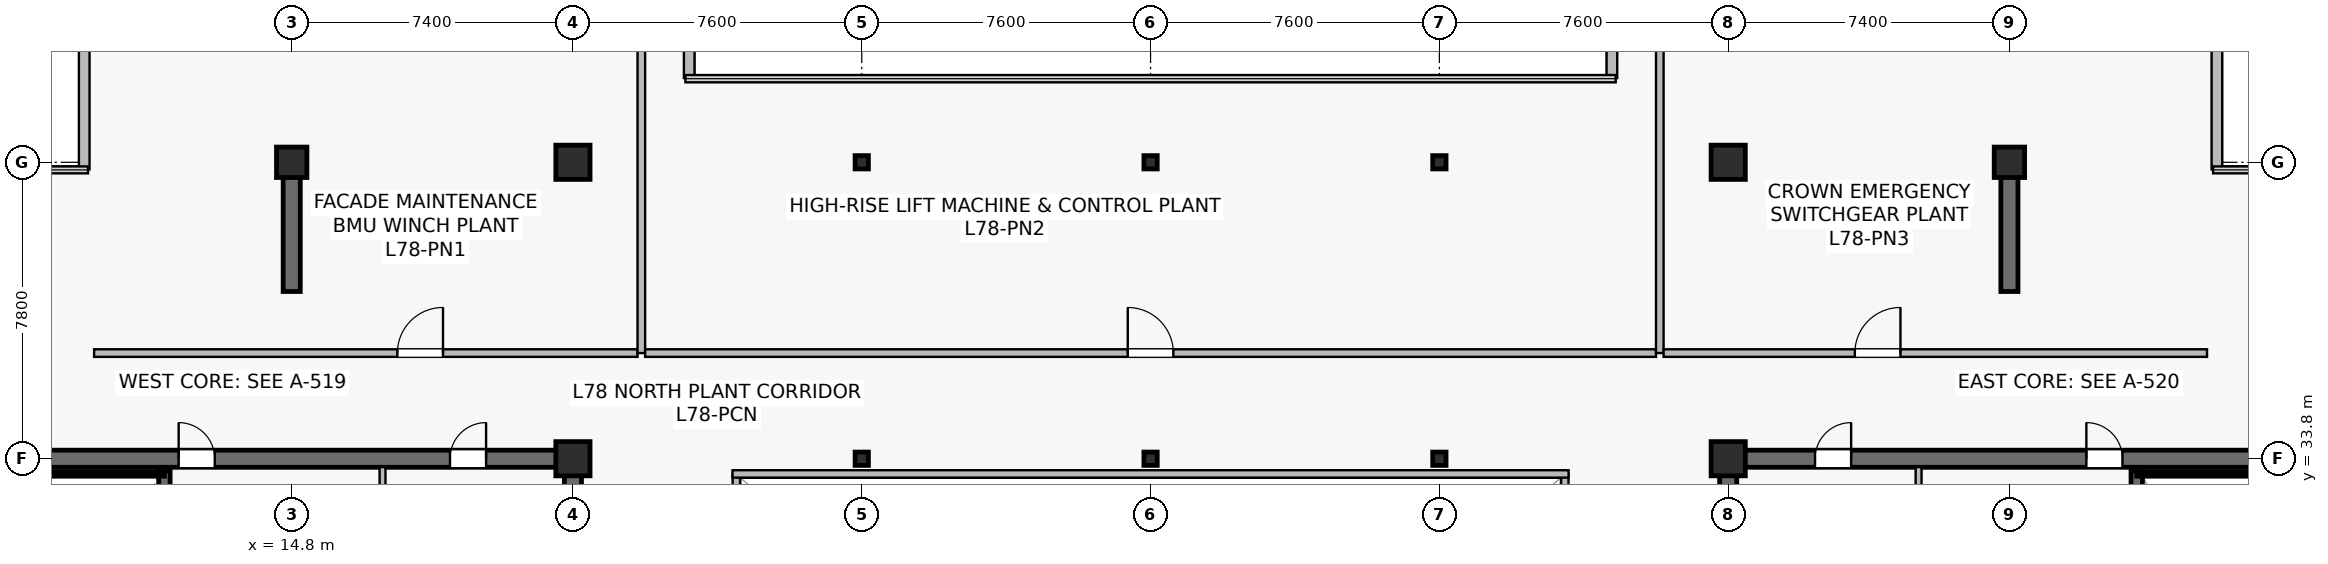
"""IFC4 building model, lengths in metres.
Left out: names, types, materials, properties, quantities, classifications, styles, units other than length and angle.
Written with IfcOpenShell. Run it as: python <this file> out.ifc"""

import sys

from ifc_helpers import new_model, si_unit, direction, frame, frame_2d, origin, origin_2d, place, context, subcontext, project, spatial, rectangle, i_section, extrude, source, transform, mapped, element, fill, save


model = new_model("IFC4")
c1 = context("Model", 3, precision=1e-05, world=origin(), true_north=direction((0.0, 1.0)))
c2 = subcontext(c1, "Body", "Model", "MODEL_VIEW")
j1 = project(units=[si_unit("LENGTHUNIT", "METRE"), si_unit("PLANEANGLEUNIT", "RADIAN")], contexts=[c1])
p1 = place(None, origin())
s1 = spatial("IfcSite", under=j1, at=p1, CompositionType="ELEMENT")
p2 = place(p1, origin())
s2 = spatial("IfcBuilding", under=s1, at=p2, CompositionType="ELEMENT")
p3 = place(p2, frame((0.0, 0.0, 327.0)))
s3 = spatial("IfcBuildingStorey", under=s2, at=p3, CompositionType="ELEMENT", Elevation=327.0)
p4 = place(p3, frame((7.175, 33.8, 0.0), z_axis=(0.0, 0.0, 1.0), x_axis=(1.0, 0.0, 0.0)))
e1 = element("IfcWall", 1, at=p4, inside=s3, PredefinedType="SHEAR", context=c2, shape_type="SweptSolid", body=[
    extrude(rectangle(XDim=15.25, YDim=0.45, at=frame_2d((7.625, 0.0))), origin(), (0.0, 0.0, 1.0), 5.12),
])
p5 = place(p4, frame((4.65, 0.0, 0.0)))
e2 = element("IfcOpeningElement", 2, at=p5, cuts=e1, PredefinedType="OPENING", context=c2, shape_type="SweptSolid", body=[
    extrude(rectangle(XDim=0.95, YDim=2.15, at=frame_2d((0.475, 1.075))), frame((0.0, 0.235, 0.0), z_axis=(0.0, -1.0, 0.0), x_axis=(1.0, 0.0, 0.0)), (0.0, 0.0, 1.0), 0.47),
])
p6 = place(p4, frame((11.79, 0.0, 0.0)))
e3 = element("IfcOpeningElement", 3, at=p6, cuts=e1, PredefinedType="OPENING", context=c2, shape_type="SweptSolid", body=[
    extrude(rectangle(XDim=0.95, YDim=2.15, at=frame_2d((0.475, 1.075))), frame((0.0, 0.235, 0.0), z_axis=(0.0, -1.0, 0.0), x_axis=(1.0, 0.0, 0.0)), (0.0, 0.0, 1.0), 0.47),
])
p7 = place(p3, frame((22.2, 15.025, 0.0), z_axis=(0.0, 0.0, 1.0), x_axis=(0.0, 1.0, 0.0)))
e4 = element("IfcWall", 4, at=p7, inside=s3, PredefinedType="SHEAR", context=c2, shape_type="SweptSolid", body=[
    extrude(rectangle(XDim=18.55, YDim=0.45, at=frame_2d((9.275, 0.0))), origin(), (0.0, 0.0, 1.0), 5.12),
])
p8 = place(p7, frame((3.525, 0.0, 0.0)))
e5 = element("IfcOpeningElement", 5, at=p8, cuts=e4, PredefinedType="OPENING", context=c2, shape_type="SweptSolid", body=[
    extrude(rectangle(XDim=1.42, YDim=2.2, at=frame_2d((0.71, 1.1))), frame((0.0, 0.235, 0.0), z_axis=(0.0, -1.0, 0.0), x_axis=(1.0, 0.0, 0.0)), (0.0, 0.0, 1.0), 0.47),
])
p9 = place(p3, frame((11.45, 24.85, 0.0), z_axis=(0.0, 0.0, 1.0), x_axis=(0.0, 1.0, 0.0)))
e6 = element("IfcWall", 6, at=p9, inside=s3, PredefinedType="SHEAR", context=c2, shape_type="SweptSolid", body=[
    extrude(rectangle(XDim=8.63, YDim=0.3, at=frame_2d((4.315, 0.0))), origin(), (0.0, 0.0, 1.0), 5.12),
])
p10 = place(p9, frame((0.42, 0.0, 0.0)))
e7 = element("IfcOpeningElement", 7, at=p10, cuts=e6, PredefinedType="OPENING", context=c2, shape_type="SweptSolid", body=[
    extrude(rectangle(XDim=1.1, YDim=2.15, at=frame_2d((0.55, 1.075))), frame((0.0, 0.16, 0.0), z_axis=(0.0, -1.0, 0.0), x_axis=(1.0, 0.0, 0.0)), (0.0, 0.0, 1.0), 0.32),
])
p11 = place(p3, frame((7.73, 33.4, 0.0), z_axis=(0.0, 0.0, 1.0), x_axis=(1.0, 0.0, 0.0)))
e8 = element("IfcWall", 8, at=p11, inside=s3, PredefinedType="SOLIDWALL", context=c2, shape_type="SweptSolid", body=[
    extrude(rectangle(XDim=3.72, YDim=0.12, at=frame_2d((1.86, 0.0))), origin(), (0.0, 0.0, 1.0), 5.12),
])
p12 = place(p3, frame((52.375, 33.8, 0.0), z_axis=(0.0, 0.0, 1.0), x_axis=(1.0, 0.0, 0.0)))
e9 = element("IfcWall", 9, at=p12, inside=s3, PredefinedType="SHEAR", context=c2, shape_type="SweptSolid", body=[
    extrude(rectangle(XDim=15.25, YDim=0.45, at=frame_2d((7.625, 0.0))), origin(), (0.0, 0.0, 1.0), 5.12),
])
p13 = place(p12, frame((9.65, 0.0, 0.0)))
e10 = element("IfcOpeningElement", 10, at=p13, cuts=e9, PredefinedType="OPENING", context=c2, shape_type="SweptSolid", body=[
    extrude(rectangle(XDim=0.95, YDim=2.15, at=frame_2d((0.475, 1.075))), frame((0.0, 0.235, 0.0), z_axis=(0.0, -1.0, 0.0), x_axis=(1.0, 0.0, 0.0)), (0.0, 0.0, 1.0), 0.47),
])
p14 = place(p12, frame((2.51, 0.0, 0.0)))
e11 = element("IfcOpeningElement", 11, at=p14, cuts=e9, PredefinedType="OPENING", context=c2, shape_type="SweptSolid", body=[
    extrude(rectangle(XDim=0.95, YDim=2.15, at=frame_2d((0.475, 1.075))), frame((0.0, 0.235, 0.0), z_axis=(0.0, -1.0, 0.0), x_axis=(1.0, 0.0, 0.0)), (0.0, 0.0, 1.0), 0.47),
])
p15 = place(p3, frame((52.6, 15.025, 0.0), z_axis=(0.0, 0.0, 1.0), x_axis=(0.0, 1.0, 0.0)))
e12 = element("IfcWall", 12, at=p15, inside=s3, PredefinedType="SHEAR", context=c2, shape_type="SweptSolid", body=[
    extrude(rectangle(XDim=18.55, YDim=0.45, at=frame_2d((9.275, 0.0))), origin(), (0.0, 0.0, 1.0), 5.12),
])
p16 = place(p15, frame((3.525, 0.0, 0.0)))
e13 = element("IfcOpeningElement", 13, at=p16, cuts=e12, PredefinedType="OPENING", context=c2, shape_type="SweptSolid", body=[
    extrude(rectangle(XDim=1.42, YDim=2.2, at=frame_2d((0.71, 1.1))), frame((0.0, 0.235, 0.0), z_axis=(0.0, -1.0, 0.0), x_axis=(1.0, 0.0, 0.0)), (0.0, 0.0, 1.0), 0.47),
])
p17 = place(p3, frame((63.35, 24.85, 0.0), z_axis=(0.0, 0.0, 1.0), x_axis=(0.0, 1.0, 0.0)))
e14 = element("IfcWall", 14, at=p17, inside=s3, PredefinedType="SHEAR", context=c2, shape_type="SweptSolid", body=[
    extrude(rectangle(XDim=8.63, YDim=0.3, at=frame_2d((4.315, 0.0))), origin(), (0.0, 0.0, 1.0), 5.12),
])
p18 = place(p17, frame((0.42, 0.0, 0.0)))
e15 = element("IfcOpeningElement", 15, at=p18, cuts=e14, PredefinedType="OPENING", context=c2, shape_type="SweptSolid", body=[
    extrude(rectangle(XDim=1.1, YDim=2.15, at=frame_2d((0.55, 1.075))), frame((0.0, 0.16, 0.0), z_axis=(0.0, -1.0, 0.0), x_axis=(1.0, 0.0, 0.0)), (0.0, 0.0, 1.0), 0.32),
])
p19 = place(p3, frame((63.35, 33.4, 0.0), z_axis=(0.0, 0.0, 1.0), x_axis=(1.0, 0.0, 0.0)))
e16 = element("IfcWall", 16, at=p19, inside=s3, PredefinedType="SOLIDWALL", context=c2, shape_type="SweptSolid", body=[
    extrude(rectangle(XDim=3.72, YDim=0.12, at=frame_2d((1.86, 0.0))), origin(), (0.0, 0.0, 1.0), 5.12),
])
for number, where, z_axis, x_axis in (
    (17, (14.8, 38.2, 0.0), (0.0, 0.0, 1.0), (0.0, 1.0, 0.0)),
    (18, (60.0, 38.2, 0.0), (0.0, 0.0, 1.0), (0.0, 1.0, 0.0)),
):
    element("IfcWall", number, at=place(p3, frame(where, z_axis=z_axis, x_axis=x_axis)), inside=s3, PredefinedType="SHEAR", context=c2, shape_type="SweptSolid", body=[
        extrude(rectangle(XDim=3.1, YDim=0.45, at=frame_2d((1.55, 0.0))), origin(), (0.0, 0.0, 1.0), 5.12),
    ])
m1 = source(origin(), c2, "Body", "SweptSolid", [
    extrude(rectangle(XDim=0.9, YDim=0.9, at=origin_2d()), origin(), (0.0, 0.0, 1.0), 5.4),
])
p20 = place(p3, frame((22.2, 33.8, 0.0), z_axis=(0.0, 0.0, 1.0), x_axis=(1.0, 0.0, 0.0)))
e19 = element("IfcColumn", 19, at=p20, inside=s3, PredefinedType="COLUMN", context=c2, shape_type="MappedRepresentation", body=[
    mapped(m1, transform((0.0, 0.0, 0.0), scale=1.0)),
])
m2 = source(origin(), c2, "Body", "SweptSolid", [
    extrude(rectangle(XDim=0.8, YDim=0.8, at=origin_2d()), origin(), (0.0, 0.0, 1.0), 5.4),
])
p21 = place(p3, frame((14.8, 41.6, 0.0), z_axis=(0.0, 0.0, 1.0), x_axis=(1.0, 0.0, 0.0)))
e20 = element("IfcColumn", 20, at=p21, inside=s3, PredefinedType="COLUMN", context=c2, shape_type="MappedRepresentation", body=[
    mapped(m2, transform((0.0, 0.0, 0.0), scale=1.0)),
])
for number, where, z_axis, x_axis in (
    (21, (22.2, 41.6, 0.0), (0.0, 0.0, 1.0), (1.0, 0.0, 0.0)),
    (22, (52.6, 33.8, 0.0), (0.0, 0.0, 1.0), (1.0, 0.0, 0.0)),
    (23, (52.6, 41.6, 0.0), (0.0, 0.0, 1.0), (1.0, 0.0, 0.0)),
):
    element("IfcColumn", number, at=place(p3, frame(where, z_axis=z_axis, x_axis=x_axis)), inside=s3, PredefinedType="COLUMN", context=c2, shape_type="MappedRepresentation", body=[
        mapped(m1, transform((0.0, 0.0, 0.0), scale=1.0)),
    ])
p22 = place(p3, frame((60.0, 41.6, 0.0), z_axis=(0.0, 0.0, 1.0), x_axis=(1.0, 0.0, 0.0)))
e24 = element("IfcColumn", 24, at=p22, inside=s3, PredefinedType="COLUMN", context=c2, shape_type="MappedRepresentation", body=[
    mapped(m2, transform((0.0, 0.0, 0.0), scale=1.0)),
])
m3 = source(origin(), c2, "Body", "SweptSolid", [
    extrude(i_section(OverallWidth=0.35, OverallDepth=0.35, WebThickness=0.012, FlangeThickness=0.019, at=origin_2d()), origin(), (0.0, 0.0, 1.0), 5.4),
])
for number, where, z_axis, x_axis in (
    (25, (29.8, 33.8, 0.0), (0.0, 0.0, 1.0), (1.0, 0.0, 0.0)),
    (26, (29.8, 41.6, 0.0), (0.0, 0.0, 1.0), (1.0, 0.0, 0.0)),
    (27, (37.4, 33.8, 0.0), (0.0, 0.0, 1.0), (1.0, 0.0, 0.0)),
    (28, (37.4, 41.6, 0.0), (0.0, 0.0, 1.0), (1.0, 0.0, 0.0)),
    (29, (45.0, 33.8, 0.0), (0.0, 0.0, 1.0), (1.0, 0.0, 0.0)),
    (30, (45.0, 41.6, 0.0), (0.0, 0.0, 1.0), (1.0, 0.0, 0.0)),
):
    element("IfcColumn", number, at=place(p3, frame(where, z_axis=z_axis, x_axis=x_axis)), inside=s3, PredefinedType="COLUMN", context=c2, shape_type="MappedRepresentation", body=[
        mapped(m3, transform((0.0, 0.0, 0.0), scale=1.0)),
    ])
p23 = place(p3, frame((65.46, 41.412, 0.0), z_axis=(0.0, 0.0, 1.0), x_axis=(0.0, 1.0, 0.0)))
e31 = element("IfcWall", 31, at=p23, inside=s3, PredefinedType="STANDARD", context=c2, shape_type="SweptSolid", body=[
    extrude(rectangle(XDim=3.488, YDim=0.28, at=frame_2d((1.744, 0.0))), origin(), (0.0, 0.0, 1.0), 5.12),
])
for number, where, z_axis, x_axis in (
    (32, (49.54, 44.9, 0.0), (0.0, 0.0, 1.0), (0.0, -1.0, 0.0)),
    (33, (25.26, 43.817, 0.0), (0.0, 0.0, 1.0), (0.0, 1.0, 0.0)),
):
    element("IfcWall", number, at=place(p3, frame(where, z_axis=z_axis, x_axis=x_axis)), inside=s3, PredefinedType="STANDARD", context=c2, shape_type="SweptSolid", body=[
        extrude(rectangle(XDim=1.083, YDim=0.28, at=frame_2d((0.542, 0.0))), origin(), (0.0, 0.0, 1.0), 5.12),
    ])
p24 = place(p3, frame((9.34, 44.9, 0.0), z_axis=(0.0, 0.0, 1.0), x_axis=(0.0, -1.0, 0.0)))
e34 = element("IfcWall", 34, at=p24, inside=s3, PredefinedType="STANDARD", context=c2, shape_type="SweptSolid", body=[
    extrude(rectangle(XDim=3.488, YDim=0.28, at=frame_2d((1.744, 0.0))), origin(), (0.0, 0.0, 1.0), 5.12),
])
for number, where, z_axis, x_axis in (
    (35, (17.19, 29.65, 0.0), (0.0, 0.0, 1.0), (0.0, 1.0, 0.0)),
    (36, (57.61, 29.65, 0.0), (0.0, 0.0, 1.0), (0.0, 1.0, 0.0)),
):
    element("IfcWall", number, at=place(p3, frame(where, z_axis=z_axis, x_axis=x_axis)), inside=s3, PredefinedType="PLUMBINGWALL", context=c2, shape_type="SweptSolid", body=[
        extrude(rectangle(XDim=3.93, YDim=0.155, at=frame_2d((1.965, 0.0))), origin(), (0.0, 0.0, 1.0), 5.12),
    ])
p25 = place(p3, frame((26.5, 15.2, 0.0), z_axis=(0.0, 0.0, 1.0), x_axis=(0.0, 1.0, 0.0)))
e37 = element("IfcWall", 37, at=p25, inside=s3, PredefinedType="SOLIDWALL", context=c2, shape_type="SweptSolid", body=[
    extrude(rectangle(XDim=18.2, YDim=0.195, at=frame_2d((9.1, 0.0))), origin(), (0.0, 0.0, 1.0), 5.12),
])
p26 = place(p25, frame((1.8, 0.0, 0.9)))
e38 = element("IfcOpeningElement", 38, at=p26, cuts=e37, PredefinedType="OPENING", context=c2, shape_type="SweptSolid", body=[
    extrude(rectangle(XDim=1.5, YDim=1.4, at=frame_2d((0.75, 0.7))), frame((0.0, 0.107, 0.0), z_axis=(0.0, -1.0, 0.0), x_axis=(1.0, 0.0, 0.0)), (0.0, 0.0, 1.0), 0.215),
])
p27 = place(p25, frame((13.2, 0.0, 0.9)))
e39 = element("IfcOpeningElement", 39, at=p27, cuts=e37, PredefinedType="OPENING", context=c2, shape_type="SweptSolid", body=[
    extrude(rectangle(XDim=1.5, YDim=1.4, at=frame_2d((0.75, 0.7))), frame((0.0, 0.107, 0.0), z_axis=(0.0, -1.0, 0.0), x_axis=(1.0, 0.0, 0.0)), (0.0, 0.0, 1.0), 0.215),
])
p28 = place(p3, frame((48.3, 15.2, 0.0), z_axis=(0.0, 0.0, 1.0), x_axis=(0.0, 1.0, 0.0)))
e40 = element("IfcWall", 40, at=p28, inside=s3, PredefinedType="SOLIDWALL", context=c2, shape_type="SweptSolid", body=[
    extrude(rectangle(XDim=18.2, YDim=0.195, at=frame_2d((9.1, 0.0))), origin(), (0.0, 0.0, 1.0), 5.12),
])
p29 = place(p28, frame((1.8, 0.0, 0.9)))
e41 = element("IfcOpeningElement", 41, at=p29, cuts=e40, PredefinedType="OPENING", context=c2, shape_type="SweptSolid", body=[
    extrude(rectangle(XDim=1.5, YDim=1.4, at=frame_2d((0.75, 0.7))), frame((0.0, 0.107, 0.0), z_axis=(0.0, -1.0, 0.0), x_axis=(1.0, 0.0, 0.0)), (0.0, 0.0, 1.0), 0.215),
])
p30 = place(p28, frame((13.2, 0.0, 0.9)))
e42 = element("IfcOpeningElement", 42, at=p30, cuts=e40, PredefinedType="OPENING", context=c2, shape_type="SweptSolid", body=[
    extrude(rectangle(XDim=1.5, YDim=1.4, at=frame_2d((0.75, 0.7))), frame((0.0, 0.107, 0.0), z_axis=(0.0, -1.0, 0.0), x_axis=(1.0, 0.0, 0.0)), (0.0, 0.0, 1.0), 0.215),
])
p31 = place(p3, frame((26.4, 33.4, 0.0), z_axis=(0.0, 0.0, 1.0), x_axis=(1.0, 0.0, 0.0)))
e43 = element("IfcWall", 43, at=p31, inside=s3, PredefinedType="SOLIDWALL", context=c2, shape_type="SweptSolid", body=[
    extrude(rectangle(XDim=22.0, YDim=0.195, at=frame_2d((11.0, 0.0))), origin(), (0.0, 0.0, 1.0), 5.12),
])
p32 = place(p3, frame((9.6, 36.58, 0.0), z_axis=(0.0, 0.0, 1.0), x_axis=(1.0, 0.0, 0.0)))
e44 = element("IfcWall", 44, at=p32, inside=s3, PredefinedType="SOLIDWALL", context=c2, shape_type="SweptSolid", body=[
    extrude(rectangle(XDim=14.3, YDim=0.2, at=frame_2d((7.15, 0.0))), origin(), (0.0, 0.0, 1.0), 4.517),
])
p33 = place(p32, frame((7.981, 0.0, 0.0)))
e45 = element("IfcOpeningElement", 45, at=p33, cuts=e44, PredefinedType="OPENING", context=c2, shape_type="SweptSolid", body=[
    extrude(rectangle(XDim=1.2, YDim=2.16, at=frame_2d((0.6, 1.08))), frame((0.0, 0.11, 0.0), z_axis=(0.0, -1.0, 0.0), x_axis=(1.0, 0.0, 0.0)), (0.0, 0.0, 1.0), 0.22),
])
p34 = place(p3, frame((24.0, 36.58, 0.0), z_axis=(0.0, 0.0, 1.0), x_axis=(0.0, 1.0, 0.0)))
e46 = element("IfcWall", 46, at=p34, inside=s3, PredefinedType="SOLIDWALL", context=c2, shape_type="SweptSolid", body=[
    extrude(rectangle(XDim=8.21, YDim=0.2, at=frame_2d((4.105, 0.0))), origin(), (0.0, 0.0, 1.0), 4.455),
])
p35 = place(p3, frame((24.1, 36.58, 0.0), z_axis=(0.0, 0.0, 1.0), x_axis=(1.0, 0.0, 0.0)))
e47 = element("IfcWall", 47, at=p35, inside=s3, PredefinedType="SOLIDWALL", context=c2, shape_type="SweptSolid", body=[
    extrude(rectangle(XDim=26.6, YDim=0.2, at=frame_2d((13.3, 0.0))), origin(), (0.0, 0.0, 1.0), 4.517),
])
p36 = place(p35, frame((12.7, 0.0, 0.0)))
e48 = element("IfcOpeningElement", 48, at=p36, cuts=e47, PredefinedType="OPENING", context=c2, shape_type="SweptSolid", body=[
    extrude(rectangle(XDim=1.2, YDim=2.16, at=frame_2d((0.6, 1.08))), frame((0.0, 0.11, 0.0), z_axis=(0.0, -1.0, 0.0), x_axis=(1.0, 0.0, 0.0)), (0.0, 0.0, 1.0), 0.22),
])
p37 = place(p3, frame((50.8, 36.58, 0.0), z_axis=(0.0, 0.0, 1.0), x_axis=(0.0, 1.0, 0.0)))
e49 = element("IfcWall", 49, at=p37, inside=s3, PredefinedType="SOLIDWALL", context=c2, shape_type="SweptSolid", body=[
    extrude(rectangle(XDim=8.21, YDim=0.2, at=frame_2d((4.105, 0.0))), origin(), (0.0, 0.0, 1.0), 4.455),
])
p38 = place(p3, frame((50.9, 36.58, 0.0), z_axis=(0.0, 0.0, 1.0), x_axis=(1.0, 0.0, 0.0)))
e50 = element("IfcWall", 50, at=p38, inside=s3, PredefinedType="SOLIDWALL", context=c2, shape_type="SweptSolid", body=[
    extrude(rectangle(XDim=14.3, YDim=0.2, at=frame_2d((7.15, 0.0))), origin(), (0.0, 0.0, 1.0), 4.517),
])
p39 = place(p38, frame((5.032, 0.0, 0.0)))
e51 = element("IfcOpeningElement", 51, at=p39, cuts=e50, PredefinedType="OPENING", context=c2, shape_type="SweptSolid", body=[
    extrude(rectangle(XDim=1.2, YDim=2.16, at=frame_2d((0.6, 1.08))), frame((0.0, 0.11, 0.0), z_axis=(0.0, -1.0, 0.0), x_axis=(1.0, 0.0, 0.0)), (0.0, 0.0, 1.0), 0.22),
])
m4 = source(origin(), c2, "Body", "SweptSolid", [
    extrude(rectangle(XDim=0.95, YDim=2.15, at=frame_2d((0.475, 1.075))), frame((0.0, 0.025, 0.0), z_axis=(0.0, -1.0, 0.0), x_axis=(1.0, 0.0, 0.0)), (0.0, 0.0, 1.0), 0.05),
])
p40 = place(p5, origin())
e52 = element("IfcDoor", 52, at=p40, inside=s3, OperationType="SINGLE_SWING_LEFT", PredefinedType="DOOR", context=c2, shape_type="MappedRepresentation", body=[
    mapped(m4, transform((0.0, 0.0, 0.0), scale=1.0)),
])
fill(e2, e52)
p41 = place(p6, origin())
e53 = element("IfcDoor", 53, at=p41, inside=s3, OperationType="SINGLE_SWING_RIGHT", PredefinedType="DOOR", context=c2, shape_type="MappedRepresentation", body=[
    mapped(m4, transform((0.0, 0.0, 0.0), scale=1.0)),
])
fill(e3, e53)
p42 = place(p13, origin())
e54 = element("IfcDoor", 54, at=p42, inside=s3, OperationType="SINGLE_SWING_LEFT", PredefinedType="DOOR", context=c2, shape_type="MappedRepresentation", body=[
    mapped(m4, transform((0.0, 0.0, 0.0), scale=1.0)),
])
fill(e10, e54)
p43 = place(p14, origin())
e55 = element("IfcDoor", 55, at=p43, inside=s3, OperationType="SINGLE_SWING_RIGHT", PredefinedType="DOOR", context=c2, shape_type="MappedRepresentation", body=[
    mapped(m4, transform((0.0, 0.0, 0.0), scale=1.0)),
])
fill(e11, e55)
m5 = source(origin(), c2, "Body", "SweptSolid", [
    extrude(rectangle(XDim=1.2, YDim=2.16, at=frame_2d((0.6, 1.08))), frame((0.0, 0.025, 0.0), z_axis=(0.0, -1.0, 0.0), x_axis=(1.0, 0.0, 0.0)), (0.0, 0.0, 1.0), 0.05),
])
p44 = place(p33, origin())
e56 = element("IfcDoor", 56, at=p44, inside=s3, OperationType="SINGLE_SWING_RIGHT", PredefinedType="DOOR", context=c2, shape_type="MappedRepresentation", body=[
    mapped(m5, transform((0.0, 0.0, 0.0), scale=1.0)),
])
fill(e45, e56)
p45 = place(p36, origin())
e57 = element("IfcDoor", 57, at=p45, inside=s3, OperationType="SINGLE_SWING_LEFT", PredefinedType="DOOR", context=c2, shape_type="MappedRepresentation", body=[
    mapped(m5, transform((0.0, 0.0, 0.0), scale=1.0)),
])
fill(e48, e57)
p46 = place(p39, origin())
e58 = element("IfcDoor", 58, at=p46, inside=s3, OperationType="SINGLE_SWING_RIGHT", PredefinedType="DOOR", context=c2, shape_type="MappedRepresentation", body=[
    mapped(m5, transform((0.0, 0.0, 0.0), scale=1.0)),
])
fill(e51, e58)
save(model, sys.argv[1])
